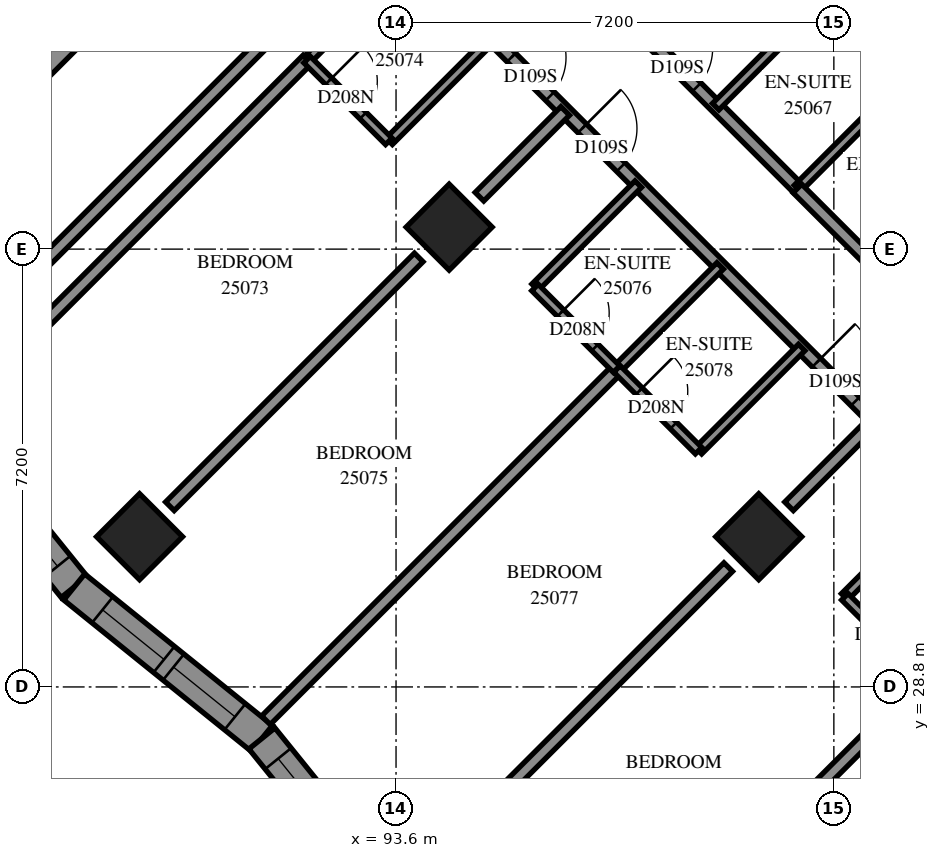
"""IFC4 building model, lengths in metres.
Left out: names, types, materials, properties, quantities, classifications, styles, units other than length and angle.
Written with IfcOpenShell. Run it as: python <this file> out.ifc"""

import sys

from ifc_helpers import new_model, si_unit, direction, frame, frame_2d, origin, origin_2d, place, context, subcontext, project, spatial, polyline, rectangle, outline, extrude, element, fill, save


model = new_model("IFC4")
c1 = context("Model", 3, precision=1e-05, world=origin(), true_north=direction((0.0, 1.0)))
c2 = subcontext(c1, "Body", "Model", "MODEL_VIEW")
j1 = project(units=[si_unit("LENGTHUNIT", "METRE"), si_unit("PLANEANGLEUNIT", "RADIAN")], contexts=[c1])
p1 = place(None, origin())
s1 = spatial("IfcSite", under=j1, at=p1, CompositionType="ELEMENT")
p2 = place(p1, origin())
s2 = spatial("IfcBuilding", under=s1, at=p2, CompositionType="ELEMENT")
p3 = place(p2, frame((0.0, 0.0, 94.8)))
s3 = spatial("IfcBuildingStorey", under=s2, at=p3, CompositionType="ELEMENT", Elevation=94.8)
for number, where, z_axis, x_axis in (
    (1, (94.474, 36.362, 0.0), (0.0, 0.0, 1.0), (0.707, -0.707, 0.0)),
    (2, (89.382, 31.271, 0.0), (0.0, 0.0, 1.0), (0.707, -0.707, 0.0)),
    (3, (99.565, 31.271, 0.0), (0.0, 0.0, 1.0), (0.707, -0.707, 0.0)),
):
    element("IfcColumn", number, at=place(p3, frame(where, z_axis=z_axis, x_axis=x_axis)), inside=s3, PredefinedType="COLUMN", context=c2, shape_type="SweptSolid", body=[
        extrude(rectangle(XDim=1.0, YDim=1.0, at=origin_2d()), origin(), (0.0, 0.0, 1.0), 3.1),
    ])
p4 = place(p3, frame((87.12, 38.625, -0.3), z_axis=(0.0, 0.0, 1.0), x_axis=(0.7071067812, 0.7071067812, 0.0)))
e4 = element("IfcWall", 4, at=p4, inside=s3, PredefinedType="SHEAR", context=c2, shape_type="SweptSolid", body=[
    extrude(rectangle(XDim=14.4, YDim=0.8, at=frame_2d((7.2, 0.0))), origin(), (0.0, 0.0, 1.0), 2.7),
])
p5 = place(p4, frame((4.55, 0.0, 0.3)))
e5 = element("IfcOpeningElement", 5, at=p5, cuts=e4, PredefinedType="OPENING", context=c2, shape_type="SweptSolid", body=[
    extrude(rectangle(XDim=1.1, YDim=2.1, at=frame_2d((0.55, 1.05))), frame((0.0, 0.41, 0.0), z_axis=(0.0, -1.0, 0.0), x_axis=(1.0, 0.0, 0.0)), (0.0, 0.0, 1.0), 0.82),
])
p6 = place(p4, frame((11.35, 0.0, 0.3)))
e6 = element("IfcOpeningElement", 6, at=p6, cuts=e4, PredefinedType="OPENING", context=c2, shape_type="SweptSolid", body=[
    extrude(rectangle(XDim=1.1, YDim=2.1, at=frame_2d((0.55, 1.05))), frame((0.0, 0.41, 0.0), z_axis=(0.0, -1.0, 0.0), x_axis=(1.0, 0.0, 0.0)), (0.0, 0.0, 1.0), 0.82),
])
p7 = place(p3, frame((85.817, 33.53, 0.0), z_axis=(0.0, 0.0, 1.0), x_axis=(0.6280530196, -0.7781705498, 0.0)))
e7 = element("IfcWall", 7, at=p7, inside=s3, PredefinedType="SOLIDWALL", context=c2, shape_type="SweptSolid", body=[
    extrude(outline(polyline([(0.029, -0.275), (3.996, -0.275), (3.937, 0.275), (-0.029, 0.275), (0.029, -0.275)])), origin(), (0.0, 0.0, 1.0), 3.1),
])
p8 = place(p7, frame((0.73, 0.0, 0.5)))
e8 = element("IfcOpeningElement", 8, at=p8, cuts=e7, PredefinedType="OPENING", context=c2, shape_type="SweptSolid", body=[
    extrude(rectangle(XDim=1.3, YDim=2.45, at=frame_2d((0.65, 1.225))), frame((0.0, 0.285, 0.0), z_axis=(0.0, -1.0, 0.0), x_axis=(1.0, 0.0, 0.0)), (0.0, 0.0, 1.0), 0.57),
])
p9 = place(p7, frame((2.229, 0.0, 0.5)))
e9 = element("IfcOpeningElement", 9, at=p9, cuts=e7, PredefinedType="OPENING", context=c2, shape_type="SweptSolid", body=[
    extrude(rectangle(XDim=1.3, YDim=2.45, at=frame_2d((0.65, 1.225))), frame((0.0, 0.285, 0.0), z_axis=(0.0, -1.0, 0.0), x_axis=(1.0, 0.0, 0.0)), (0.0, 0.0, 1.0), 0.57),
])
p10 = place(p3, frame((88.308, 30.444, 0.0), z_axis=(0.0, 0.0, 1.0), x_axis=(0.7781705498, -0.6280530196, 0.0)))
e10 = element("IfcWall", 10, at=p10, inside=s3, PredefinedType="SOLIDWALL", context=c2, shape_type="SweptSolid", body=[
    extrude(outline(polyline([(-0.029, -0.275), (3.937, -0.275), (3.996, 0.275), (0.029, 0.275), (-0.029, -0.275)])), origin(), (0.0, 0.0, 1.0), 3.1),
])
p11 = place(p10, frame((0.598, 0.0, 0.5)))
e11 = element("IfcOpeningElement", 11, at=p11, cuts=e10, PredefinedType="OPENING", context=c2, shape_type="SweptSolid", body=[
    extrude(rectangle(XDim=1.3, YDim=2.45, at=frame_2d((0.65, 1.225))), frame((0.0, 0.285, 0.0), z_axis=(0.0, -1.0, 0.0), x_axis=(1.0, 0.0, 0.0)), (0.0, 0.0, 1.0), 0.57),
])
p12 = place(p10, frame((2.098, 0.0, 0.5)))
e12 = element("IfcOpeningElement", 12, at=p12, cuts=e10, PredefinedType="OPENING", context=c2, shape_type="SweptSolid", body=[
    extrude(rectangle(XDim=1.3, YDim=2.45, at=frame_2d((0.65, 1.225))), frame((0.0, 0.285, 0.0), z_axis=(0.0, -1.0, 0.0), x_axis=(1.0, 0.0, 0.0)), (0.0, 0.0, 1.0), 0.57),
])
p13 = place(p3, frame((91.394, 27.953, 0.0), z_axis=(0.0, 0.0, 1.0), x_axis=(0.6280530196, -0.7781705498, 0.0)))
e13 = element("IfcWall", 13, at=p13, inside=s3, PredefinedType="SOLIDWALL", context=c2, shape_type="SweptSolid", body=[
    extrude(outline(polyline([(0.029, -0.275), (3.996, -0.275), (3.937, 0.275), (-0.029, 0.275), (0.029, -0.275)])), origin(), (0.0, 0.0, 1.0), 3.1),
])
p14 = place(p13, frame((0.425, 0.0, 0.5)))
e14 = element("IfcOpeningElement", 14, at=p14, cuts=e13, PredefinedType="OPENING", context=c2, shape_type="SweptSolid", body=[
    extrude(rectangle(XDim=1.3, YDim=2.45, at=frame_2d((0.65, 1.225))), frame((0.0, 0.285, 0.0), z_axis=(0.0, -1.0, 0.0), x_axis=(1.0, 0.0, 0.0)), (0.0, 0.0, 1.0), 0.57),
])
p15 = place(p13, frame((1.925, 0.0, 0.5)))
e15 = element("IfcOpeningElement", 15, at=p15, cuts=e13, PredefinedType="OPENING", context=c2, shape_type="SweptSolid", body=[
    extrude(rectangle(XDim=1.3, YDim=2.45, at=frame_2d((0.65, 1.225))), frame((0.0, 0.285, 0.0), z_axis=(0.0, -1.0, 0.0), x_axis=(1.0, 0.0, 0.0)), (0.0, 0.0, 1.0), 0.57),
])
p16 = place(p3, frame((93.339, 41.309, 0.0), z_axis=(0.0, 0.0, 1.0), x_axis=(0.7071067812, -0.7071067812, 0.0)))
e16 = element("IfcWall", 16, at=p16, inside=s3, PredefinedType="PARTITIONING", context=c2, shape_type="SweptSolid", body=[
    extrude(rectangle(XDim=18.702, YDim=0.2, at=frame_2d((9.351, 0.0))), origin(), (0.0, 0.0, 1.0), 3.1),
])
p17 = place(p16, frame((3.05, 0.0, 0.0)))
e17 = element("IfcOpeningElement", 17, at=p17, cuts=e16, PredefinedType="OPENING", context=c2, shape_type="SweptSolid", body=[
    extrude(rectangle(XDim=0.9, YDim=2.1, at=frame_2d((0.45, 1.05))), frame((0.0, 0.11, 0.0), z_axis=(0.0, -1.0, 0.0), x_axis=(1.0, 0.0, 0.0)), (0.0, 0.0, 1.0), 0.22),
])
p18 = place(p16, frame((4.7, 0.0, 0.0)))
e18 = element("IfcOpeningElement", 18, at=p18, cuts=e16, PredefinedType="OPENING", context=c2, shape_type="SweptSolid", body=[
    extrude(rectangle(XDim=0.9, YDim=2.1, at=frame_2d((0.45, 1.05))), frame((0.0, 0.11, 0.0), z_axis=(0.0, -1.0, 0.0), x_axis=(1.0, 0.0, 0.0)), (0.0, 0.0, 1.0), 0.22),
])
p19 = place(p16, frame((10.149, 0.0, 0.0)))
e19 = element("IfcOpeningElement", 19, at=p19, cuts=e16, PredefinedType="OPENING", context=c2, shape_type="SweptSolid", body=[
    extrude(rectangle(XDim=0.9, YDim=2.1, at=frame_2d((0.45, 1.05))), frame((0.0, 0.11, 0.0), z_axis=(0.0, -1.0, 0.0), x_axis=(1.0, 0.0, 0.0)), (0.0, 0.0, 1.0), 0.22),
])
p20 = place(p16, frame((11.9, 0.0, 0.0)))
e20 = element("IfcOpeningElement", 20, at=p20, cuts=e16, PredefinedType="OPENING", context=c2, shape_type="SweptSolid", body=[
    extrude(rectangle(XDim=0.9, YDim=2.1, at=frame_2d((0.45, 1.05))), frame((0.0, 0.11, 0.0), z_axis=(0.0, -1.0, 0.0), x_axis=(1.0, 0.0, 0.0)), (0.0, 0.0, 1.0), 0.22),
])
p21 = place(p16, frame((17.45, 0.0, 0.0)))
e21 = element("IfcOpeningElement", 21, at=p21, cuts=e16, PredefinedType="OPENING", context=c2, shape_type="SweptSolid", body=[
    extrude(rectangle(XDim=0.9, YDim=2.1, at=frame_2d((0.45, 1.05))), frame((0.0, 0.11, 0.0), z_axis=(0.0, -1.0, 0.0), x_axis=(1.0, 0.0, 0.0)), (0.0, 0.0, 1.0), 0.22),
])
p22 = place(p3, frame((86.835, 34.806, 0.0), z_axis=(0.0, 0.0, 1.0), x_axis=(0.7071067812, 0.7071067812, 0.0)))
e22 = element("IfcWall", 22, at=p22, inside=s3, PredefinedType="PARTITIONING", context=c2, shape_type="SweptSolid", body=[
    extrude(rectangle(XDim=9.201, YDim=0.2, at=frame_2d((4.601, 0.0))), origin(), (0.0, 0.0, 1.0), 3.1),
])
p23 = place(p3, frame((96.496, 23.113, 0.0), z_axis=(0.0, 0.0, 1.0), x_axis=(0.7071067812, 0.7071067812, 0.0)))
e23 = element("IfcWall", 23, at=p23, inside=s3, PredefinedType="PARTITIONING", context=c2, shape_type="SweptSolid", body=[
    extrude(rectangle(XDim=8.24, YDim=0.2, at=frame_2d((4.12, 0.0))), origin(), (0.0, 0.0, 1.0), 3.1),
])
p24 = place(p3, frame((86.343, 33.316, 0.0), z_axis=(0.0, 0.0, 1.0), x_axis=(0.7069848641, 0.7072286772, 0.0)))
e24 = element("IfcWall", 24, at=p24, inside=s3, PredefinedType="PARTITIONING", context=c2, shape_type="SweptSolid", body=[
    extrude(rectangle(XDim=8.203, YDim=0.2, at=frame_2d((4.101, 0.0))), origin(), (0.0, 0.0, 1.0), 3.1),
])
p25 = place(p3, frame((91.461, 28.253, 0.0), z_axis=(0.0, 0.0, 1.0), x_axis=(0.7072231255, 0.7069904178, 0.0)))
e25 = element("IfcWall", 25, at=p25, inside=s3, PredefinedType="PARTITIONING", context=c2, shape_type="SweptSolid", body=[
    extrude(rectangle(XDim=8.165, YDim=0.2, at=frame_2d((4.082, 0.0))), origin(), (0.0, 0.0, 1.0), 3.1),
])
p26 = place(p3, frame((94.62, 42.587, 0.0), z_axis=(0.0, 0.0, 1.0), x_axis=(0.7071067812, -0.7071067812, 0.0)))
e26 = element("IfcWall", 26, at=p26, inside=s3, PredefinedType="PARTITIONING", context=c2, shape_type="SweptSolid", body=[
    extrude(rectangle(XDim=7.9, YDim=0.2, at=frame_2d((3.95, 0.0))), origin(), (0.0, 0.0, 1.0), 3.1),
])
p27 = place(p26, frame((2.998, 0.0, 0.0)))
e27 = element("IfcOpeningElement", 27, at=p27, cuts=e26, PredefinedType="OPENING", context=c2, shape_type="SweptSolid", body=[
    extrude(rectangle(XDim=0.9, YDim=2.1, at=frame_2d((0.45, 1.05))), frame((0.0, 0.11, 0.0), z_axis=(0.0, -1.0, 0.0), x_axis=(1.0, 0.0, 0.0)), (0.0, 0.0, 1.0), 0.22),
])
p28 = place(p26, frame((4.649, 0.0, 0.0)))
e28 = element("IfcOpeningElement", 28, at=p28, cuts=e26, PredefinedType="OPENING", context=c2, shape_type="SweptSolid", body=[
    extrude(rectangle(XDim=0.9, YDim=2.1, at=frame_2d((0.45, 1.05))), frame((0.0, 0.11, 0.0), z_axis=(0.0, -1.0, 0.0), x_axis=(1.0, 0.0, 0.0)), (0.0, 0.0, 1.0), 0.22),
])
p29 = place(p3, frame((89.881, 31.771, 0.0), z_axis=(0.0, 0.0, 1.0), x_axis=(0.7071067812, 0.7071067812, 0.0)))
e29 = element("IfcWall", 29, at=p29, inside=s3, PredefinedType="PARTITIONING", context=c2, shape_type="SweptSolid", body=[
    extrude(rectangle(XDim=5.787, YDim=0.2, at=frame_2d((2.893, 0.0))), origin(), (0.0, 0.0, 1.0), 3.1),
])
p30 = place(p3, frame((94.973, 26.681, 0.0), z_axis=(0.0, 0.0, 1.0), x_axis=(0.7071067812, 0.7071067812, 0.0)))
e30 = element("IfcWall", 30, at=p30, inside=s3, PredefinedType="PARTITIONING", context=c2, shape_type="SweptSolid", body=[
    extrude(rectangle(XDim=5.784, YDim=0.2, at=frame_2d((2.892, 0.0))), origin(), (0.0, 0.0, 1.0), 3.1),
])
for number, where, z_axis, x_axis in (
    (31, (100.977, 30.281, 0.0), (0.0, 0.0, 1.0), (0.707, 0.707, 0.0)),
    (32, (98.573, 32.685, 0.0), (0.0, 0.0, 1.0), (0.707, 0.707, 0.0)),
):
    element("IfcWall", number, at=place(p3, frame(where, z_axis=z_axis, x_axis=x_axis)), inside=s3, PredefinedType="PARTITIONING", context=c2, shape_type="SweptSolid", body=[
        extrude(rectangle(XDim=2.401, YDim=0.15, at=frame_2d((1.201, 0.0))), origin(), (0.0, 0.0, 1.0), 3.1),
    ])
for number, where, z_axis, x_axis in (
    (33, (92.143, 39.117, 0.0), (0.0, 0.0, 1.0), (0.708, 0.707, 0.0)),
    (34, (93.487, 37.773, 0.0), (0.0, 0.0, 1.0), (0.707, 0.708, 0.0)),
    (35, (97.234, 34.026, 0.0), (0.0, 0.0, 1.0), (0.707, 0.708, 0.0)),
    (36, (100.203, 36.997, 0.0), (0.0, 0.0, 1.0), (0.707, 0.708, 0.0)),
):
    element("IfcWall", number, at=place(p3, frame(where, z_axis=z_axis, x_axis=x_axis)), inside=s3, PredefinedType="PARTITIONING", context=c2, shape_type="SweptSolid", body=[
        extrude(rectangle(XDim=2.4, YDim=0.15, at=frame_2d((1.2, 0.0))), origin(), (0.0, 0.0, 1.0), 3.1),
    ])
for number, where, z_axis, x_axis in (
    (37, (95.887, 35.373, 0.0), (0.0, 0.0, 1.0), (0.707, 0.707, 0.0)),
    (38, (98.857, 38.343, 0.0), (0.0, 0.0, 1.0), (0.707, 0.707, 0.0)),
):
    element("IfcWall", number, at=place(p3, frame(where, z_axis=z_axis, x_axis=x_axis)), inside=s3, PredefinedType="PARTITIONING", context=c2, shape_type="SweptSolid", body=[
        extrude(rectangle(XDim=2.398, YDim=0.15, at=frame_2d((1.199, 0.0))), origin(), (0.0, 0.0, 1.0), 3.1),
    ])
for number, where, z_axis, x_axis in (
    (39, (100.063, 31.771, 0.0), (0.0, 0.0, 1.0), (0.707, 0.707, 0.0)),
    (40, (94.972, 36.862, 0.0), (0.0, 0.0, 1.0), (0.707, 0.707, 0.0)),
):
    element("IfcWall", number, at=place(p3, frame(where, z_axis=z_axis, x_axis=x_axis)), inside=s3, PredefinedType="PARTITIONING", context=c2, shape_type="SweptSolid", body=[
        extrude(rectangle(XDim=1.994, YDim=0.2, at=frame_2d((0.997, 0.0))), origin(), (0.0, 0.0, 1.0), 3.1),
    ])
p31 = place(p3, frame((95.885, 35.369, 0.0), z_axis=(0.0, 0.0, 1.0), x_axis=(0.7071067812, -0.7071067812, 0.0)))
e41 = element("IfcWall", 41, at=p31, inside=s3, PredefinedType="PARTITIONING", context=c2, shape_type="SweptSolid", body=[
    extrude(rectangle(XDim=1.901, YDim=0.15, at=frame_2d((0.95, 0.0))), origin(), (0.0, 0.0, 1.0), 3.1),
])
p32 = place(p31, frame((0.595, 0.0, 0.0)))
e42 = element("IfcOpeningElement", 42, at=p32, cuts=e41, PredefinedType="OPENING", context=c2, shape_type="SweptSolid", body=[
    extrude(rectangle(XDim=0.8, YDim=2.1, at=frame_2d((0.4, 1.05))), frame((0.0, 0.085, 0.0), z_axis=(0.0, -1.0, 0.0), x_axis=(1.0, 0.0, 0.0)), (0.0, 0.0, 1.0), 0.17),
])
p33 = place(p3, frame((92.137, 39.117, 0.0), z_axis=(0.0, 0.0, 1.0), x_axis=(0.7071067812, -0.7071067812, 0.0)))
e43 = element("IfcWall", 43, at=p33, inside=s3, PredefinedType="PARTITIONING", context=c2, shape_type="SweptSolid", body=[
    extrude(rectangle(XDim=1.901, YDim=0.15, at=frame_2d((0.95, 0.0))), origin(), (0.0, 0.0, 1.0), 3.1),
])
p34 = place(p33, frame((0.502, 0.0, 0.0)))
e44 = element("IfcOpeningElement", 44, at=p34, cuts=e43, PredefinedType="OPENING", context=c2, shape_type="SweptSolid", body=[
    extrude(rectangle(XDim=0.8, YDim=2.1, at=frame_2d((0.4, 1.05))), frame((0.0, 0.085, 0.0), z_axis=(0.0, -1.0, 0.0), x_axis=(1.0, 0.0, 0.0)), (0.0, 0.0, 1.0), 0.17),
])
p35 = place(p3, frame((100.981, 30.283, 0.0), z_axis=(0.0, 0.0, 1.0), x_axis=(0.7076330979, -0.7065800724, 0.0)))
e45 = element("IfcWall", 45, at=p35, inside=s3, PredefinedType="PARTITIONING", context=c2, shape_type="SweptSolid", body=[
    extrude(rectangle(XDim=1.899, YDim=0.15, at=frame_2d((0.95, 0.0))), origin(), (0.0, 0.0, 1.0), 3.1),
])
p36 = place(p35, frame((0.493, 0.0, 0.0)))
e46 = element("IfcOpeningElement", 46, at=p36, cuts=e45, PredefinedType="OPENING", context=c2, shape_type="SweptSolid", body=[
    extrude(rectangle(XDim=0.8, YDim=2.1, at=frame_2d((0.4, 1.05))), frame((0.0, 0.085, 0.0), z_axis=(0.0, -1.0, 0.0), x_axis=(1.0, 0.0, 0.0)), (0.0, 0.0, 1.0), 0.17),
])
p37 = place(p3, frame((100.553, 40.037, 0.0), z_axis=(0.0, 0.0, 1.0), x_axis=(0.7076330979, -0.7065800724, 0.0)))
e47 = element("IfcWall", 47, at=p37, inside=s3, PredefinedType="PARTITIONING", context=c2, shape_type="SweptSolid", body=[
    extrude(rectangle(XDim=1.899, YDim=0.15, at=frame_2d((0.95, 0.0))), origin(), (0.0, 0.0, 1.0), 3.1),
])
p38 = place(p37, frame((0.493, 0.0, 0.0)))
e48 = element("IfcOpeningElement", 48, at=p38, cuts=e47, PredefinedType="OPENING", context=c2, shape_type="SweptSolid", body=[
    extrude(rectangle(XDim=0.8, YDim=2.1, at=frame_2d((0.4, 1.05))), frame((0.0, 0.085, 0.0), z_axis=(0.0, -1.0, 0.0), x_axis=(1.0, 0.0, 0.0)), (0.0, 0.0, 1.0), 0.17),
])
p39 = place(p3, frame((97.233, 34.029, 0.0), z_axis=(0.0, 0.0, 1.0), x_axis=(0.7065800724, -0.7076330979, 0.0)))
e49 = element("IfcWall", 49, at=p39, inside=s3, PredefinedType="PARTITIONING", context=c2, shape_type="SweptSolid", body=[
    extrude(rectangle(XDim=1.899, YDim=0.15, at=frame_2d((0.95, 0.0))), origin(), (0.0, 0.0, 1.0), 3.1),
])
p40 = place(p39, frame((0.515, 0.0, 0.0)))
e50 = element("IfcOpeningElement", 50, at=p40, cuts=e49, PredefinedType="OPENING", context=c2, shape_type="SweptSolid", body=[
    extrude(rectangle(XDim=0.8, YDim=2.1, at=frame_2d((0.4, 1.05))), frame((0.0, 0.085, 0.0), z_axis=(0.0, -1.0, 0.0), x_axis=(1.0, 0.0, 0.0)), (0.0, 0.0, 1.0), 0.17),
])
p41 = place(p3, frame((100.201, 36.997, 0.0), z_axis=(0.0, 0.0, 1.0), x_axis=(0.7076330979, -0.7065800724, 0.0)))
e51 = element("IfcWall", 51, at=p41, inside=s3, PredefinedType="PARTITIONING", context=c2, shape_type="SweptSolid", body=[
    extrude(rectangle(XDim=1.899, YDim=0.2, at=frame_2d((0.95, 0.0))), origin(), (0.0, 0.0, 1.0), 3.1),
])
p42 = place(p9, origin())
e52 = element("IfcWindow", 52, at=p42, inside=s3, PartitioningType="SINGLE_PANEL", PredefinedType="WINDOW", context=c2, shape_type="SweptSolid", body=[
    extrude(rectangle(XDim=1.3, YDim=2.45, at=frame_2d((0.65, 1.225))), frame((0.0, 0.155, 0.0), z_axis=(0.0, -1.0, 0.0), x_axis=(1.0, 0.0, 0.0)), (0.0, 0.0, 1.0), 0.06),
])
fill(e9, e52)
p43 = place(p11, origin())
e53 = element("IfcWindow", 53, at=p43, inside=s3, PartitioningType="SINGLE_PANEL", PredefinedType="WINDOW", context=c2, shape_type="SweptSolid", body=[
    extrude(rectangle(XDim=1.3, YDim=2.45, at=frame_2d((0.65, 1.225))), frame((0.0, 0.155, 0.0), z_axis=(0.0, -1.0, 0.0), x_axis=(1.0, 0.0, 0.0)), (0.0, 0.0, 1.0), 0.06),
])
fill(e11, e53)
p44 = place(p12, origin())
e54 = element("IfcWindow", 54, at=p44, inside=s3, PartitioningType="SINGLE_PANEL", PredefinedType="WINDOW", context=c2, shape_type="SweptSolid", body=[
    extrude(rectangle(XDim=1.3, YDim=2.45, at=frame_2d((0.65, 1.225))), frame((0.0, 0.155, 0.0), z_axis=(0.0, -1.0, 0.0), x_axis=(1.0, 0.0, 0.0)), (0.0, 0.0, 1.0), 0.06),
])
fill(e12, e54)
p45 = place(p14, origin())
e55 = element("IfcWindow", 55, at=p45, inside=s3, PartitioningType="SINGLE_PANEL", PredefinedType="WINDOW", context=c2, shape_type="SweptSolid", body=[
    extrude(rectangle(XDim=1.3, YDim=2.45, at=frame_2d((0.65, 1.225))), frame((0.0, 0.155, 0.0), z_axis=(0.0, -1.0, 0.0), x_axis=(1.0, 0.0, 0.0)), (0.0, 0.0, 1.0), 0.06),
])
fill(e14, e55)
p46 = place(p28, origin())
e56 = element("IfcDoor", 56, at=p46, inside=s3, OperationType="SINGLE_SWING_LEFT", PredefinedType="DOOR", context=c2, shape_type="SweptSolid", body=[
    extrude(rectangle(XDim=0.9, YDim=2.1, at=frame_2d((0.45, 1.05))), frame((0.0, 0.025, 0.0), z_axis=(0.0, -1.0, 0.0), x_axis=(1.0, 0.0, 0.0)), (0.0, 0.0, 1.0), 0.05),
])
fill(e28, e56)
p47 = place(p38, origin())
e57 = element("IfcDoor", 57, at=p47, inside=s3, OperationType="SINGLE_SWING_RIGHT", PredefinedType="DOOR", context=c2, shape_type="SweptSolid", body=[
    extrude(rectangle(XDim=0.8, YDim=2.1, at=frame_2d((0.4, 1.05))), frame((0.0, 0.025, 0.0), z_axis=(0.0, -1.0, 0.0), x_axis=(1.0, 0.0, 0.0)), (0.0, 0.0, 1.0), 0.05),
])
fill(e48, e57)
p48 = place(p17, origin())
e58 = element("IfcDoor", 58, at=p48, inside=s3, OperationType="SINGLE_SWING_LEFT", PredefinedType="DOOR", context=c2, shape_type="SweptSolid", body=[
    extrude(rectangle(XDim=0.9, YDim=2.1, at=frame_2d((0.45, 1.05))), frame((0.0, 0.025, 0.0), z_axis=(0.0, -1.0, 0.0), x_axis=(1.0, 0.0, 0.0)), (0.0, 0.0, 1.0), 0.05),
])
fill(e17, e58)
p49 = place(p34, origin())
e59 = element("IfcDoor", 59, at=p49, inside=s3, OperationType="SINGLE_SWING_RIGHT", PredefinedType="DOOR", context=c2, shape_type="SweptSolid", body=[
    extrude(rectangle(XDim=0.8, YDim=2.1, at=frame_2d((0.4, 1.05))), frame((0.0, 0.025, 0.0), z_axis=(0.0, -1.0, 0.0), x_axis=(1.0, 0.0, 0.0)), (0.0, 0.0, 1.0), 0.05),
])
fill(e44, e59)
p50 = place(p18, origin())
e60 = element("IfcDoor", 60, at=p50, inside=s3, OperationType="SINGLE_SWING_RIGHT", PredefinedType="DOOR", context=c2, shape_type="SweptSolid", body=[
    extrude(rectangle(XDim=0.9, YDim=2.1, at=frame_2d((0.45, 1.05))), frame((0.0, 0.025, 0.0), z_axis=(0.0, -1.0, 0.0), x_axis=(1.0, 0.0, 0.0)), (0.0, 0.0, 1.0), 0.05),
])
fill(e18, e60)
p51 = place(p32, origin())
e61 = element("IfcDoor", 61, at=p51, inside=s3, OperationType="SINGLE_SWING_RIGHT", PredefinedType="DOOR", context=c2, shape_type="SweptSolid", body=[
    extrude(rectangle(XDim=0.8, YDim=2.1, at=frame_2d((0.4, 1.05))), frame((0.0, 0.025, 0.0), z_axis=(0.0, -1.0, 0.0), x_axis=(1.0, 0.0, 0.0)), (0.0, 0.0, 1.0), 0.05),
])
fill(e42, e61)
p52 = place(p19, origin())
e62 = element("IfcDoor", 62, at=p52, inside=s3, OperationType="SINGLE_SWING_LEFT", PredefinedType="DOOR", context=c2, shape_type="SweptSolid", body=[
    extrude(rectangle(XDim=0.9, YDim=2.1, at=frame_2d((0.45, 1.05))), frame((0.0, 0.025, 0.0), z_axis=(0.0, -1.0, 0.0), x_axis=(1.0, 0.0, 0.0)), (0.0, 0.0, 1.0), 0.05),
])
fill(e19, e62)
p53 = place(p40, origin())
e63 = element("IfcDoor", 63, at=p53, inside=s3, OperationType="SINGLE_SWING_RIGHT", PredefinedType="DOOR", context=c2, shape_type="SweptSolid", body=[
    extrude(rectangle(XDim=0.8, YDim=2.1, at=frame_2d((0.4, 1.05))), frame((0.0, 0.025, 0.0), z_axis=(0.0, -1.0, 0.0), x_axis=(1.0, 0.0, 0.0)), (0.0, 0.0, 1.0), 0.05),
])
fill(e50, e63)
save(model, sys.argv[1])
